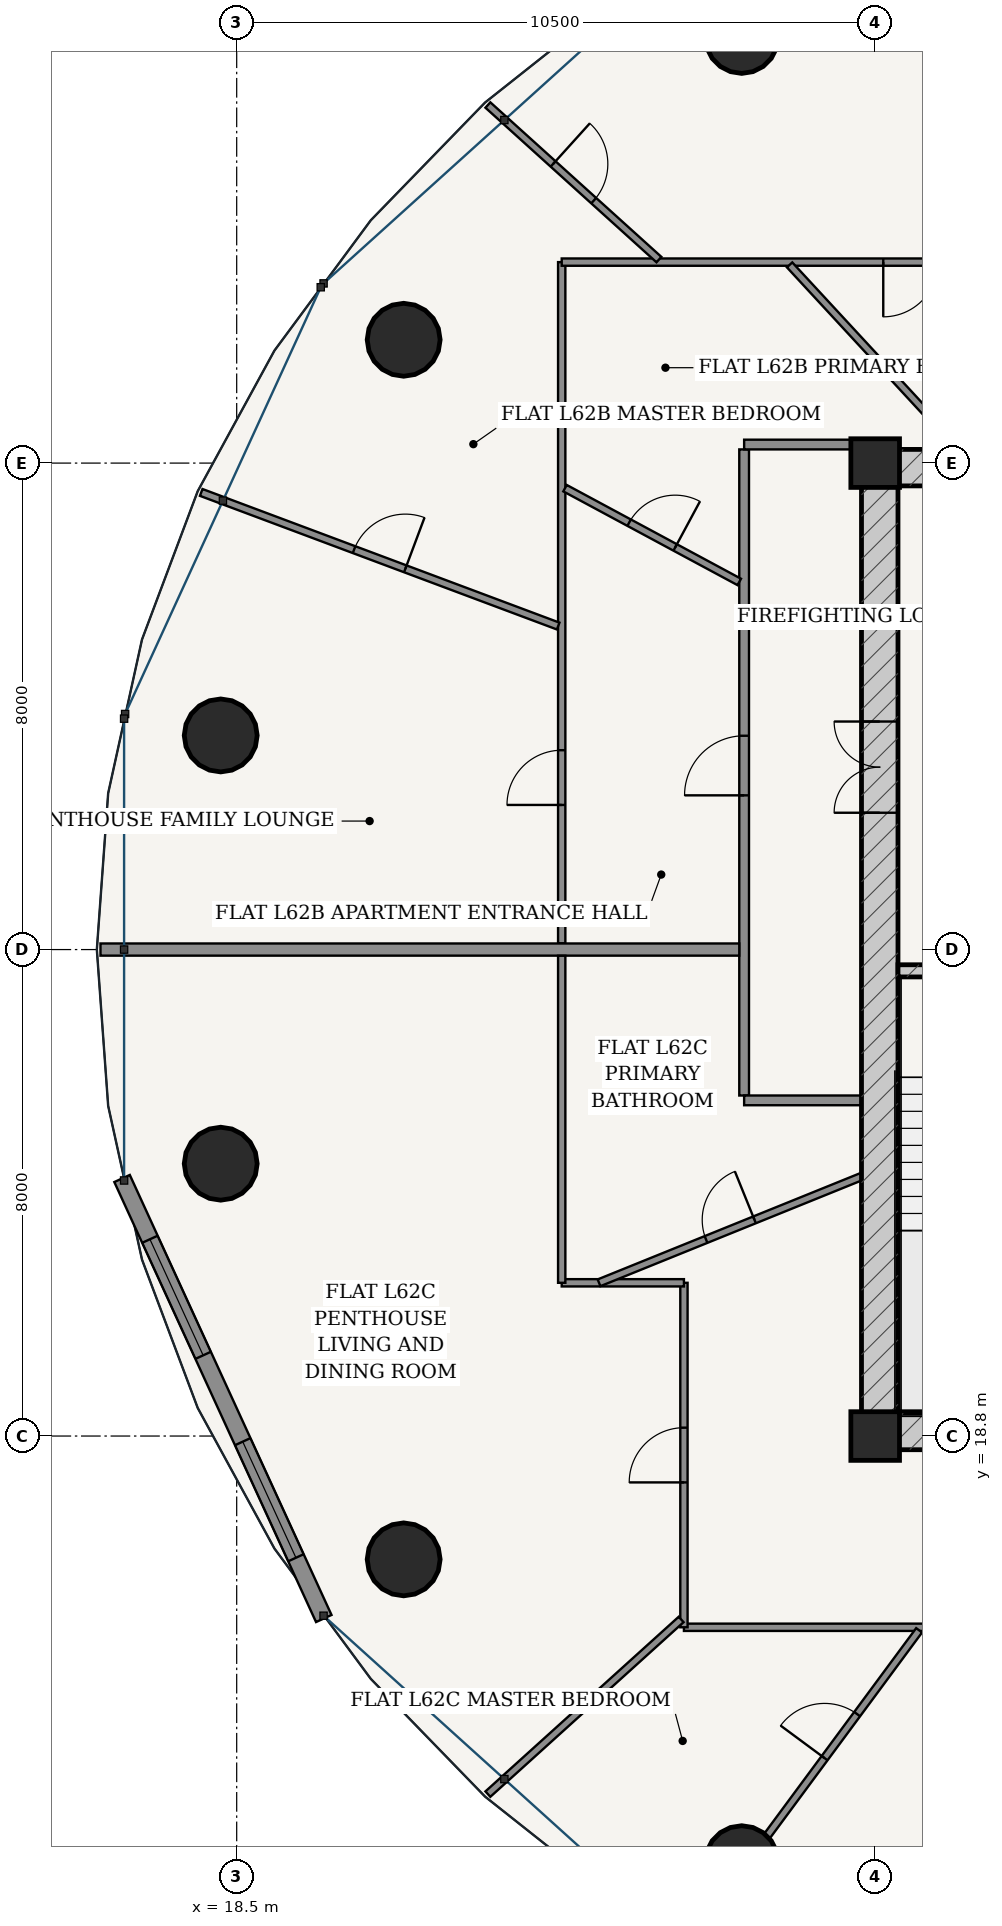
"""IFC4 building model, lengths in metres.
Left out: names, types, materials, properties, quantities, classifications, styles, units other than length and angle.
Written with IfcOpenShell. Run it as: python <this file> out.ifc"""

import sys

from ifc_helpers import new_model, si_unit, direction, frame, frame_2d, origin, origin_2d, place, context, subcontext, project, spatial, rectangle, hollow_circle, extrude, source, transform, mapped, element, fill, save


model = new_model("IFC4")
c1 = context("Model", 3, precision=1e-05, world=origin(), true_north=direction((-0.2419218956, 0.970295726276)))
c2 = subcontext(c1, "Body", "Model", "MODEL_VIEW")
j1 = project(units=[si_unit("LENGTHUNIT", "METRE"), si_unit("PLANEANGLEUNIT", "RADIAN")], contexts=[c1])
p1 = place(None, origin())
s1 = spatial("IfcSite", under=j1, at=p1, CompositionType="ELEMENT")
p2 = place(p1, origin())
s2 = spatial("IfcBuilding", under=s1, at=p2, CompositionType="ELEMENT")
p3 = place(p2, frame((0.0, 0.0, 235.6)))
s3 = spatial("IfcBuildingStorey", under=s2, at=p3, CompositionType="ELEMENT", Elevation=235.6)
for number, where, z_axis, x_axis in (
    (1, (29.0, 18.8, 0.0), (0.0, 0.0, 1.0), (1.0, 0.0, 0.0)),
    (2, (29.0, 34.8, 0.0), (0.0, 0.0, 1.0), (1.0, 0.0, 0.0)),
):
    element("IfcColumn", number, at=place(p3, frame(where, z_axis=z_axis, x_axis=x_axis)), inside=s3, PredefinedType="COLUMN", context=c2, shape_type="SweptSolid", body=[
        extrude(rectangle(XDim=0.8, YDim=0.8, at=origin_2d()), origin(), (0.0, 0.0, 1.0), 3.7),
    ])
p4 = place(p3, frame((28.775, 18.875, 0.0), z_axis=(0.0, 0.0, 1.0), x_axis=(1.0, 0.0, 0.0)))
e3 = element("IfcWall", 3, at=p4, inside=s3, PredefinedType="SHEAR", context=c2, shape_type="SweptSolid", body=[
    extrude(rectangle(XDim=18.45, YDim=0.6, at=frame_2d((9.225, 0.0))), origin(), (0.0, 0.0, 1.0), 3.435),
])
p5 = place(p4, frame((6.76, 0.0, 0.0)))
e4 = element("IfcOpeningElement", 4, at=p5, cuts=e3, PredefinedType="OPENING", context=c2, shape_type="SweptSolid", body=[
    extrude(rectangle(XDim=0.85, YDim=2.1, at=frame_2d((0.425, 1.05))), frame((0.0, 0.31, 0.0), z_axis=(0.0, -1.0, 0.0), x_axis=(1.0, 0.0, 0.0)), (0.0, 0.0, 1.0), 0.62),
])
p6 = place(p4, frame((8.8, 0.0, 0.0)))
e5 = element("IfcOpeningElement", 5, at=p6, cuts=e3, PredefinedType="OPENING", context=c2, shape_type="SweptSolid", body=[
    extrude(rectangle(XDim=0.85, YDim=2.1, at=frame_2d((0.425, 1.05))), frame((0.0, 0.31, 0.0), z_axis=(0.0, -1.0, 0.0), x_axis=(1.0, 0.0, 0.0)), (0.0, 0.0, 1.0), 0.62),
])
p7 = place(p4, frame((10.84, 0.0, 0.0)))
e6 = element("IfcOpeningElement", 6, at=p7, cuts=e3, PredefinedType="OPENING", context=c2, shape_type="SweptSolid", body=[
    extrude(rectangle(XDim=0.85, YDim=2.1, at=frame_2d((0.425, 1.05))), frame((0.0, 0.31, 0.0), z_axis=(0.0, -1.0, 0.0), x_axis=(1.0, 0.0, 0.0)), (0.0, 0.0, 1.0), 0.62),
])
p8 = place(p3, frame((28.775, 34.725, 0.0), z_axis=(0.0, 0.0, 1.0), x_axis=(1.0, 0.0, 0.0)))
e7 = element("IfcWall", 7, at=p8, inside=s3, PredefinedType="SHEAR", context=c2, shape_type="SweptSolid", body=[
    extrude(rectangle(XDim=18.45, YDim=0.6, at=frame_2d((9.225, 0.0))), origin(), (0.0, 0.0, 1.0), 3.435),
])
p9 = place(p3, frame((29.075, 19.175, 0.0), z_axis=(0.0, 0.0, 1.0), x_axis=(0.0, 1.0, 0.0)))
e8 = element("IfcWall", 8, at=p9, inside=s3, PredefinedType="SHEAR", context=c2, shape_type="SweptSolid", body=[
    extrude(rectangle(XDim=15.25, YDim=0.6, at=frame_2d((7.625, 0.0))), origin(), (0.0, 0.0, 1.0), 3.435),
])
p10 = place(p9, frame((9.875, 0.0, 0.0)))
e9 = element("IfcOpeningElement", 9, at=p10, cuts=e8, PredefinedType="OPENING", context=c2, shape_type="SweptSolid", body=[
    extrude(rectangle(XDim=1.5, YDim=2.2, at=frame_2d((0.75, 1.1))), frame((0.0, 0.31, 0.0), z_axis=(0.0, -1.0, 0.0), x_axis=(1.0, 0.0, 0.0)), (0.0, 0.0, 1.0), 0.62),
])
p11 = place(p3, frame((29.375, 26.45, 0.0), z_axis=(0.0, 0.0, 1.0), x_axis=(1.0, 0.0, 0.0)))
e10 = element("IfcWall", 10, at=p11, inside=s3, PredefinedType="SOLIDWALL", context=c2, shape_type="SweptSolid", body=[
    extrude(rectangle(XDim=3.32, YDim=0.2, at=frame_2d((1.66, 0.0))), origin(), (0.0, 0.0, 1.0), 3.435),
])
p12 = place(p11, frame((1.185, 0.0, 0.0)))
e11 = element("IfcOpeningElement", 11, at=p12, cuts=e10, PredefinedType="OPENING", context=c2, shape_type="SweptSolid", body=[
    extrude(rectangle(XDim=0.95, YDim=2.15, at=frame_2d((0.475, 1.075))), frame((0.0, 0.11, 0.0), z_axis=(0.0, -1.0, 0.0), x_axis=(1.0, 0.0, 0.0)), (0.0, 0.0, 1.0), 0.22),
])
for number, where, z_axis, x_axis in (
    (12, (26.805, 41.808, 0.0), (0.0, 0.0, 1.0), (1.0, 0.0, 0.0)),
    (13, (21.246, 36.828, 0.0), (0.0, 0.0, 1.0), (1.0, 0.0, 0.0)),
    (14, (18.237, 30.321, 0.0), (0.0, 0.0, 1.0), (1.0, 0.0, 0.0)),
    (15, (18.237, 23.279, 0.0), (0.0, 0.0, 1.0), (1.0, 0.0, 0.0)),
    (16, (21.246, 16.772, 0.0), (0.0, 0.0, 1.0), (1.0, 0.0, 0.0)),
    (17, (26.805, 11.792, 0.0), (0.0, 0.0, 1.0), (1.0, 0.0, 0.0)),
):
    element("IfcColumn", number, at=place(p3, frame(where, z_axis=z_axis, x_axis=x_axis)), inside=s3, PredefinedType="COLUMN", context=c2, shape_type="SweptSolid", body=[
        extrude(hollow_circle(Radius=0.6, WallThickness=0.038, at=origin_2d()), origin(), (0.0, 0.0, 1.0), 3.7),
    ])
p13 = place(p3, frame((16.615, 23.035, 0.0), z_axis=(0.0, 0.0, 1.0), x_axis=(0.416717018135, -0.909036262641, 0.0)))
e18 = element("IfcWall", 18, at=p13, inside=s3, PredefinedType="SOLIDWALL", context=c2, shape_type="SweptSolid", body=[
    extrude(rectangle(XDim=7.96, YDim=0.28, at=frame_2d((3.98, 0.0))), origin(), (0.0, 0.0, 1.0), 3.435),
])
p14 = place(p13, frame((1.099, 0.0, 0.85)))
e19 = element("IfcOpeningElement", 19, at=p14, cuts=e18, PredefinedType="OPENING", context=c2, shape_type="SweptSolid", body=[
    extrude(rectangle(XDim=2.1, YDim=1.95, at=frame_2d((1.05, 0.975))), frame((0.0, 0.15, 0.0), z_axis=(0.0, -1.0, 0.0), x_axis=(1.0, 0.0, 0.0)), (0.0, 0.0, 1.0), 0.3),
])
p15 = place(p13, frame((4.761, 0.0, 0.85)))
e20 = element("IfcOpeningElement", 20, at=p15, cuts=e18, PredefinedType="OPENING", context=c2, shape_type="SweptSolid", body=[
    extrude(rectangle(XDim=2.1, YDim=1.95, at=frame_2d((1.05, 0.975))), frame((0.0, 0.15, 0.0), z_axis=(0.0, -1.0, 0.0), x_axis=(1.0, 0.0, 0.0)), (0.0, 0.0, 1.0), 0.3),
])
p16 = place(p3, frame((26.845, 24.4, 0.0), z_axis=(0.0, 0.0, 1.0), x_axis=(0.0, 1.0, 0.0)))
e21 = element("IfcWall", 21, at=p16, inside=s3, PredefinedType="PARTITIONING", context=c2, shape_type="SweptSolid", body=[
    extrude(rectangle(XDim=10.625, YDim=0.16, at=frame_2d((5.312, 0.0))), origin(), (0.0, 0.0, 1.0), 2.951),
])
p17 = place(p16, frame((4.936, 0.0, 0.0)))
e22 = element("IfcOpeningElement", 22, at=p17, cuts=e21, PredefinedType="OPENING", context=c2, shape_type="SweptSolid", body=[
    extrude(rectangle(XDim=0.98, YDim=2.2, at=frame_2d((0.49, 1.1))), frame((0.0, 0.09, 0.0), z_axis=(0.0, -1.0, 0.0), x_axis=(1.0, 0.0, 0.0)), (0.0, 0.0, 1.0), 0.18),
])
for number, where, z_axis, x_axis in (
    (23, (26.845, 35.105, 0.0), (0.0, 0.0, 1.0), (1.0, 0.0, 0.0)),
    (24, (26.845, 24.32, 0.0), (0.0, 0.0, 1.0), (1.0, 0.0, 0.0)),
):
    element("IfcWall", number, at=place(p3, frame(where, z_axis=z_axis, x_axis=x_axis)), inside=s3, PredefinedType="PARTITIONING", context=c2, shape_type="SweptSolid", body=[
        extrude(rectangle(XDim=1.93, YDim=0.16, at=frame_2d((0.965, 0.0))), origin(), (0.0, 0.0, 1.0), 3.435),
    ])
p18 = place(p3, frame((23.845, 26.902, 0.0), z_axis=(0.0, 0.0, 1.0), x_axis=(0.0, 1.0, 0.0)))
e25 = element("IfcWall", 25, at=p18, inside=s3, PredefinedType="PARTITIONING", context=c2, shape_type="SweptSolid", body=[
    extrude(rectangle(XDim=11.203, YDim=0.12, at=frame_2d((5.602, 0.0))), origin(), (0.0, 0.0, 1.0), 2.951),
])
p19 = place(p18, frame((2.276, 0.0, 0.0)))
e26 = element("IfcOpeningElement", 26, at=p19, cuts=e25, PredefinedType="OPENING", context=c2, shape_type="SweptSolid", body=[
    extrude(rectangle(XDim=0.9, YDim=2.15, at=frame_2d((0.45, 1.075))), frame((0.0, 0.07, 0.0), z_axis=(0.0, -1.0, 0.0), x_axis=(1.0, 0.0, 0.0)), (0.0, 0.0, 1.0), 0.14),
])
p20 = place(p3, frame((23.845, 38.105, 0.0), z_axis=(0.0, 0.0, 1.0), x_axis=(1.0, 0.0, 0.0)))
e27 = element("IfcWall", 27, at=p20, inside=s3, PredefinedType="PARTITIONING", context=c2, shape_type="SweptSolid", body=[
    extrude(rectangle(XDim=8.01, YDim=0.12, at=frame_2d((4.005, 0.0))), origin(), (0.0, 0.0, 1.0), 2.951),
])
p21 = place(p20, frame((5.288, 0.0, 0.0)))
e28 = element("IfcOpeningElement", 28, at=p21, cuts=e27, PredefinedType="OPENING", context=c2, shape_type="SweptSolid", body=[
    extrude(rectangle(XDim=0.9, YDim=2.15, at=frame_2d((0.45, 1.075))), frame((0.0, 0.07, 0.0), z_axis=(0.0, -1.0, 0.0), x_axis=(1.0, 0.0, 0.0)), (0.0, 0.0, 1.0), 0.14),
])
p22 = place(p3, frame((25.444, 38.146, 0.0), z_axis=(0.0, 0.0, 1.0), x_axis=(-0.741941434687, 0.670464695189, 0.0)))
e29 = element("IfcWall", 29, at=p22, inside=s3, PredefinedType="PARTITIONING", context=c2, shape_type="SweptSolid", body=[
    extrude(rectangle(XDim=3.792, YDim=0.12, at=frame_2d((1.896, 0.0))), origin(), (0.0, 0.0, 1.0), 2.951),
])
p23 = place(p22, frame((1.446, 0.0, 0.0)))
e30 = element("IfcOpeningElement", 30, at=p23, cuts=e29, PredefinedType="OPENING", context=c2, shape_type="SweptSolid", body=[
    extrude(rectangle(XDim=0.9, YDim=2.15, at=frame_2d((0.45, 1.075))), frame((0.0, 0.07, 0.0), z_axis=(0.0, -1.0, 0.0), x_axis=(1.0, 0.0, 0.0)), (0.0, 0.0, 1.0), 0.14),
])
p24 = place(p3, frame((23.787, 32.12, 0.0), z_axis=(0.0, 0.0, 1.0), x_axis=(-0.936540304423, 0.35055992097, 0.0)))
e31 = element("IfcWall", 31, at=p24, inside=s3, PredefinedType="PARTITIONING", context=c2, shape_type="SweptSolid", body=[
    extrude(rectangle(XDim=6.268, YDim=0.12, at=frame_2d((3.134, 0.0))), origin(), (0.0, 0.0, 1.0), 2.951),
])
p25 = place(p24, frame((2.684, 0.0, 0.0)))
e32 = element("IfcOpeningElement", 32, at=p25, cuts=e31, PredefinedType="OPENING", context=c2, shape_type="SweptSolid", body=[
    extrude(rectangle(XDim=0.9, YDim=2.15, at=frame_2d((0.45, 1.075))), frame((0.0, 0.07, 0.0), z_axis=(0.0, -1.0, 0.0), x_axis=(1.0, 0.0, 0.0)), (0.0, 0.0, 1.0), 0.14),
])
p26 = place(p3, frame((30.396, 35.026, 0.0), z_axis=(0.0, 0.0, 1.0), x_axis=(-0.678748871003, 0.73437045836, 0.0)))
e33 = element("IfcWall", 33, at=p26, inside=s3, PredefinedType="PARTITIONING", context=c2, shape_type="SweptSolid", body=[
    extrude(rectangle(XDim=4.13, YDim=0.12, at=frame_2d((2.065, 0.0))), origin(), (0.0, 0.0, 1.0), 2.951),
])
p27 = place(p3, frame((26.765, 32.845, 0.0), z_axis=(0.0, 0.0, 1.0), x_axis=(-0.88057708661, 0.473902937886, 0.0)))
e34 = element("IfcWall", 34, at=p27, inside=s3, PredefinedType="PARTITIONING", context=c2, shape_type="SweptSolid", body=[
    extrude(rectangle(XDim=3.254, YDim=0.12, at=frame_2d((1.627, 0.0))), origin(), (0.0, 0.0, 1.0), 3.11),
])
p28 = place(p27, frame((1.197, 0.0, 0.0)))
e35 = element("IfcOpeningElement", 35, at=p28, cuts=e34, PredefinedType="OPENING", context=c2, shape_type="SweptSolid", body=[
    extrude(rectangle(XDim=0.86, YDim=2.15, at=frame_2d((0.43, 1.075))), frame((0.0, 0.07, 0.0), z_axis=(0.0, -1.0, 0.0), x_axis=(1.0, 0.0, 0.0)), (0.0, 0.0, 1.0), 0.14),
])
p29 = place(p3, frame((26.765, 26.8, 0.0), z_axis=(0.0, 0.0, 1.0), x_axis=(-1.0, 0.0, 0.0)))
e36 = element("IfcWall", 36, at=p29, inside=s3, PredefinedType="PARTITIONING", context=c2, shape_type="SweptSolid", body=[
    extrude(rectangle(XDim=10.505, YDim=0.2, at=frame_2d((5.252, 0.0))), origin(), (0.0, 0.0, 1.0), 2.951),
])
p30 = place(p3, frame((31.32, 15.655, 0.0), z_axis=(0.0, 0.0, 1.0), x_axis=(-1.0, 0.0, 0.0)))
e37 = element("IfcWall", 37, at=p30, inside=s3, PredefinedType="PARTITIONING", context=c2, shape_type="SweptSolid", body=[
    extrude(rectangle(XDim=5.465, YDim=0.12, at=frame_2d((2.732, 0.0))), origin(), (0.0, 0.0, 1.0), 2.951),
])
p31 = place(p3, frame((25.855, 15.655, 0.0), z_axis=(0.0, 0.0, 1.0), x_axis=(0.0, 1.0, 0.0)))
e38 = element("IfcWall", 38, at=p31, inside=s3, PredefinedType="PARTITIONING", context=c2, shape_type="SweptSolid", body=[
    extrude(rectangle(XDim=5.665, YDim=0.12, at=frame_2d((2.833, 0.0))), origin(), (0.0, 0.0, 1.0), 2.951),
])
p32 = place(p31, frame((2.383, 0.0, 0.0)))
e39 = element("IfcOpeningElement", 39, at=p32, cuts=e38, PredefinedType="OPENING", context=c2, shape_type="SweptSolid", body=[
    extrude(rectangle(XDim=0.9, YDim=2.15, at=frame_2d((0.45, 1.075))), frame((0.0, 0.07, 0.0), z_axis=(0.0, -1.0, 0.0), x_axis=(1.0, 0.0, 0.0)), (0.0, 0.0, 1.0), 0.14),
])
p33 = place(p3, frame((25.855, 21.32, 0.0), z_axis=(0.0, 0.0, 1.0), x_axis=(-1.0, 0.0, 0.0)))
e40 = element("IfcWall", 40, at=p33, inside=s3, PredefinedType="PARTITIONING", context=c2, shape_type="SweptSolid", body=[
    extrude(rectangle(XDim=2.01, YDim=0.12, at=frame_2d((1.005, 0.0))), origin(), (0.0, 0.0, 1.0), 3.11),
])
p34 = place(p3, frame((23.845, 21.32, 0.0), z_axis=(0.0, 0.0, 1.0), x_axis=(0.0, 1.0, 0.0)))
e41 = element("IfcWall", 41, at=p34, inside=s3, PredefinedType="PARTITIONING", context=c2, shape_type="SweptSolid", body=[
    extrude(rectangle(XDim=5.378, YDim=0.12, at=frame_2d((2.689, 0.0))), origin(), (0.0, 0.0, 1.0), 2.951),
])
p35 = place(p3, frame((25.809, 15.783, 0.0), z_axis=(0.0, 0.0, 1.0), x_axis=(-0.741938009522, -0.670468485483, 0.0)))
e42 = element("IfcWall", 42, at=p35, inside=s3, PredefinedType="PARTITIONING", context=c2, shape_type="SweptSolid", body=[
    extrude(rectangle(XDim=4.284, YDim=0.12, at=frame_2d((2.142, 0.0))), origin(), (0.0, 0.0, 1.0), 2.951),
])
p36 = place(p3, frame((29.722, 15.605, 0.0), z_axis=(0.0, 0.0, 1.0), x_axis=(-0.594518724985, -0.80408176552, 0.0)))
e43 = element("IfcWall", 43, at=p36, inside=s3, PredefinedType="PARTITIONING", context=c2, shape_type="SweptSolid", body=[
    extrude(rectangle(XDim=6.344, YDim=0.12, at=frame_2d((3.172, 0.0))), origin(), (0.0, 0.0, 1.0), 2.951),
])
p37 = place(p36, frame((1.714, 0.0, 0.0)))
e44 = element("IfcOpeningElement", 44, at=p37, cuts=e43, PredefinedType="OPENING", context=c2, shape_type="SweptSolid", body=[
    extrude(rectangle(XDim=0.9, YDim=2.15, at=frame_2d((0.45, 1.075))), frame((0.0, 0.07, 0.0), z_axis=(0.0, -1.0, 0.0), x_axis=(1.0, 0.0, 0.0)), (0.0, 0.0, 1.0), 0.14),
])
p38 = place(p3, frame((28.775, 23.067, 0.0), z_axis=(0.0, 0.0, 1.0), x_axis=(-0.926979373422, -0.375112304851, 0.0)))
e45 = element("IfcWall", 45, at=p38, inside=s3, PredefinedType="PARTITIONING", context=c2, shape_type="SweptSolid", body=[
    extrude(rectangle(XDim=4.656, YDim=0.12, at=frame_2d((2.328, 0.0))), origin(), (0.0, 0.0, 1.0), 3.435),
])
p39 = place(p38, frame((1.898, 0.0, 0.0)))
e46 = element("IfcOpeningElement", 46, at=p39, cuts=e45, PredefinedType="OPENING", context=c2, shape_type="SweptSolid", body=[
    extrude(rectangle(XDim=0.86, YDim=2.15, at=frame_2d((0.43, 1.075))), frame((0.0, 0.07, 0.0), z_axis=(0.0, -1.0, 0.0), x_axis=(1.0, 0.0, 0.0)), (0.0, 0.0, 1.0), 0.14),
])
m1 = source(origin(), c2, "Body", "SweptSolid", [
    extrude(rectangle(XDim=2.1, YDim=1.95, at=frame_2d((1.05, 0.975))), frame((0.0, 0.03, 0.0), z_axis=(0.0, -1.0, 0.0), x_axis=(1.0, 0.0, 0.0)), (0.0, 0.0, 1.0), 0.06),
])
p40 = place(p14, origin())
e47 = element("IfcWindow", 47, at=p40, inside=s3, PartitioningType="SINGLE_PANEL", PredefinedType="WINDOW", context=c2, shape_type="MappedRepresentation", body=[
    mapped(m1, transform((0.0, 0.0, 0.0), scale=1.0)),
])
fill(e19, e47)
p41 = place(p15, origin())
e48 = element("IfcWindow", 48, at=p41, inside=s3, PartitioningType="SINGLE_PANEL", PredefinedType="WINDOW", context=c2, shape_type="MappedRepresentation", body=[
    mapped(m1, transform((0.0, 0.0, 0.0), scale=1.0)),
])
fill(e20, e48)
m2 = source(origin(), c2, "Body", "SweptSolid", [
    extrude(rectangle(XDim=1.5, YDim=2.2, at=frame_2d((0.75, 1.1))), frame((0.0, 0.025, 0.0), z_axis=(0.0, -1.0, 0.0), x_axis=(1.0, 0.0, 0.0)), (0.0, 0.0, 1.0), 0.05),
])
p42 = place(p10, origin())
e49 = element("IfcDoor", 49, at=p42, inside=s3, OperationType="DOUBLE_DOOR_SINGLE_SWING", PredefinedType="DOOR", context=c2, shape_type="MappedRepresentation", body=[
    mapped(m2, transform((0.0, 0.0, 0.0), scale=1.0)),
])
fill(e9, e49)
m3 = source(origin(), c2, "Body", "SweptSolid", [
    extrude(rectangle(XDim=0.98, YDim=2.2, at=frame_2d((0.49, 1.1))), frame((0.0, 0.025, 0.0), z_axis=(0.0, -1.0, 0.0), x_axis=(1.0, 0.0, 0.0)), (0.0, 0.0, 1.0), 0.05),
])
p43 = place(p17, origin())
e50 = element("IfcDoor", 50, at=p43, inside=s3, OperationType="SINGLE_SWING_LEFT", PredefinedType="DOOR", context=c2, shape_type="MappedRepresentation", body=[
    mapped(m3, transform((0.0, 0.0, 0.0), scale=1.0)),
])
fill(e22, e50)
m4 = source(origin(), c2, "Body", "SweptSolid", [
    extrude(rectangle(XDim=0.86, YDim=2.15, at=frame_2d((0.43, 1.075))), frame((0.0, 0.025, 0.0), z_axis=(0.0, -1.0, 0.0), x_axis=(1.0, 0.0, 0.0)), (0.0, 0.0, 1.0), 0.05),
])
p44 = place(p28, frame((0.86, 0.0, 0.0), z_axis=(0.0, 0.0, 1.0), x_axis=(-1.0, 0.0, 0.0)))
e51 = element("IfcDoor", 51, at=p44, inside=s3, OperationType="SINGLE_SWING_RIGHT", PredefinedType="DOOR", context=c2, shape_type="MappedRepresentation", body=[
    mapped(m4, transform((0.0, 0.0, 0.0), scale=1.0)),
])
fill(e35, e51)
m5 = source(origin(), c2, "Body", "SweptSolid", [
    extrude(rectangle(XDim=0.9, YDim=2.15, at=frame_2d((0.45, 1.075))), frame((0.0, 0.025, 0.0), z_axis=(0.0, -1.0, 0.0), x_axis=(1.0, 0.0, 0.0)), (0.0, 0.0, 1.0), 0.05),
])
p45 = place(p19, origin())
e52 = element("IfcDoor", 52, at=p45, inside=s3, OperationType="SINGLE_SWING_LEFT", PredefinedType="DOOR", context=c2, shape_type="MappedRepresentation", body=[
    mapped(m5, transform((0.0, 0.0, 0.0), scale=1.0)),
])
fill(e26, e52)
p46 = place(p25, frame((0.9, 0.0, 0.0), z_axis=(0.0, 0.0, 1.0), x_axis=(-1.0, 0.0, 0.0)))
e53 = element("IfcDoor", 53, at=p46, inside=s3, OperationType="SINGLE_SWING_RIGHT", PredefinedType="DOOR", context=c2, shape_type="MappedRepresentation", body=[
    mapped(m5, transform((0.0, 0.0, 0.0), scale=1.0)),
])
fill(e32, e53)
p47 = place(p23, frame((0.9, 0.0, 0.0), z_axis=(0.0, 0.0, 1.0), x_axis=(-1.0, 0.0, 0.0)))
e54 = element("IfcDoor", 54, at=p47, inside=s3, OperationType="SINGLE_SWING_LEFT", PredefinedType="DOOR", context=c2, shape_type="MappedRepresentation", body=[
    mapped(m5, transform((0.0, 0.0, 0.0), scale=1.0)),
])
fill(e30, e54)
p48 = place(p21, frame((0.9, 0.0, 0.0), z_axis=(0.0, 0.0, 1.0), x_axis=(-1.0, 0.0, 0.0)))
e55 = element("IfcDoor", 55, at=p48, inside=s3, OperationType="SINGLE_SWING_RIGHT", PredefinedType="DOOR", context=c2, shape_type="MappedRepresentation", body=[
    mapped(m5, transform((0.0, 0.0, 0.0), scale=1.0)),
])
fill(e28, e55)
p49 = place(p37, frame((0.9, 0.0, 0.0), z_axis=(0.0, 0.0, 1.0), x_axis=(-1.0, 0.0, 0.0)))
e56 = element("IfcDoor", 56, at=p49, inside=s3, OperationType="SINGLE_SWING_LEFT", PredefinedType="DOOR", context=c2, shape_type="MappedRepresentation", body=[
    mapped(m5, transform((0.0, 0.0, 0.0), scale=1.0)),
])
fill(e44, e56)
p50 = place(p39, frame((0.86, 0.0, 0.0), z_axis=(0.0, 0.0, 1.0), x_axis=(-1.0, 0.0, 0.0)))
e57 = element("IfcDoor", 57, at=p50, inside=s3, OperationType="SINGLE_SWING_RIGHT", PredefinedType="DOOR", context=c2, shape_type="MappedRepresentation", body=[
    mapped(m4, transform((0.0, 0.0, 0.0), scale=1.0)),
])
fill(e46, e57)
p51 = place(p32, origin())
e58 = element("IfcDoor", 58, at=p51, inside=s3, OperationType="SINGLE_SWING_LEFT", PredefinedType="DOOR", context=c2, shape_type="MappedRepresentation", body=[
    mapped(m5, transform((0.0, 0.0, 0.0), scale=1.0)),
])
fill(e39, e58)
save(model, sys.argv[1])
